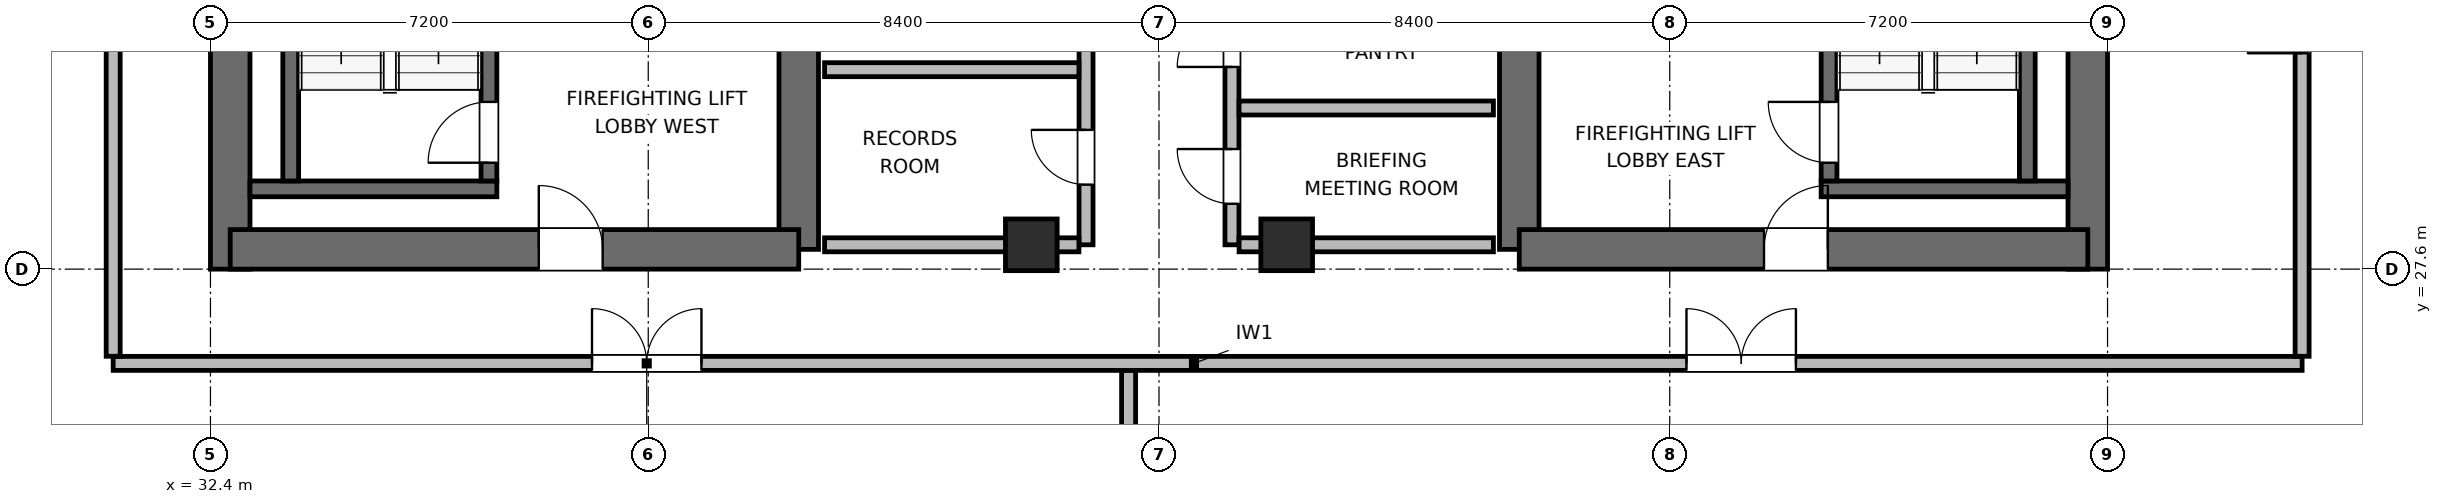
"""IFC4 building model, lengths in metres.
Left out: names, types, materials, properties, quantities, classifications, styles, units other than length and angle.
Written with IfcOpenShell. Run it as: python <this file> out.ifc"""

import sys

from ifc_helpers import new_model, si_unit, direction, frame, frame_2d, origin, origin_2d, place, context, subcontext, project, spatial, rectangle, extrude, element, fill, save


model = new_model("IFC4")
c1 = context("Model", 3, precision=1e-05, world=origin(), true_north=direction((0.0, 1.0)))
c2 = subcontext(c1, "Body", "Model", "MODEL_VIEW")
j1 = project(units=[si_unit("LENGTHUNIT", "METRE"), si_unit("PLANEANGLEUNIT", "RADIAN")], contexts=[c1])
p1 = place(None, origin())
s1 = spatial("IfcSite", under=j1, at=p1, CompositionType="ELEMENT")
p2 = place(p1, origin())
s2 = spatial("IfcBuilding", under=s1, at=p2, CompositionType="ELEMENT")
p3 = place(p2, frame((0.0, 0.0, 255.0)))
s3 = spatial("IfcBuildingStorey", under=s2, at=p3, CompositionType="ELEMENT", Elevation=255.0)
p4 = place(p3, frame((32.725, 27.6, 0.0), z_axis=(0.0, 0.0, 1.0), x_axis=(0.0, 1.0, 0.0)))
e1 = element("IfcWall", 1, at=p4, inside=s3, PredefinedType="SHEAR", context=c2, shape_type="SweptSolid", body=[
    extrude(rectangle(XDim=16.8, YDim=0.65, at=frame_2d((8.4, 0.0))), origin(), (0.0, 0.0, 1.0), 3.9),
])
p5 = place(p3, frame((42.075, 27.925, 0.0), z_axis=(0.0, 0.0, 1.0), x_axis=(0.0, 1.0, 0.0)))
e2 = element("IfcWall", 2, at=p5, inside=s3, PredefinedType="SHEAR", context=c2, shape_type="SweptSolid", body=[
    extrude(rectangle(XDim=6.475, YDim=0.65, at=frame_2d((3.237, 0.0))), origin(), (0.0, 0.0, 1.0), 3.9),
])
p6 = place(p3, frame((32.725, 27.925, 0.0), z_axis=(0.0, 0.0, 1.0), x_axis=(1.0, 0.0, 0.0)))
e3 = element("IfcWall", 3, at=p6, inside=s3, PredefinedType="SHEAR", context=c2, shape_type="SweptSolid", body=[
    extrude(rectangle(XDim=9.35, YDim=0.65, at=frame_2d((4.675, 0.0))), origin(), (0.0, 0.0, 1.0), 3.9),
])
p7 = place(p6, frame((5.075, 0.0, 0.0)))
e4 = element("IfcOpeningElement", 4, at=p7, cuts=e3, PredefinedType="OPENING", context=c2, shape_type="SweptSolid", body=[
    extrude(rectangle(XDim=1.05, YDim=2.04, at=frame_2d((0.525, 1.02))), frame((0.0, 0.335, 0.0), z_axis=(0.0, -1.0, 0.0), x_axis=(1.0, 0.0, 0.0)), (0.0, 0.0, 1.0), 0.67),
])
p8 = place(p3, frame((53.925, 27.925, 0.0), z_axis=(0.0, 0.0, 1.0), x_axis=(0.0, 1.0, 0.0)))
e5 = element("IfcWall", 5, at=p8, inside=s3, PredefinedType="SHEAR", context=c2, shape_type="SweptSolid", body=[
    extrude(rectangle(XDim=7.875, YDim=0.65, at=frame_2d((3.938, 0.0))), origin(), (0.0, 0.0, 1.0), 3.9),
])
p9 = place(p3, frame((63.275, 27.6, 0.0), z_axis=(0.0, 0.0, 1.0), x_axis=(0.0, 1.0, 0.0)))
e6 = element("IfcWall", 6, at=p9, inside=s3, PredefinedType="SHEAR", context=c2, shape_type="SweptSolid", body=[
    extrude(rectangle(XDim=16.8, YDim=0.65, at=frame_2d((8.4, 0.0))), origin(), (0.0, 0.0, 1.0), 3.9),
])
p10 = place(p3, frame((53.925, 27.925, 0.0), z_axis=(0.0, 0.0, 1.0), x_axis=(1.0, 0.0, 0.0)))
e7 = element("IfcWall", 7, at=p10, inside=s3, PredefinedType="SHEAR", context=c2, shape_type="SweptSolid", body=[
    extrude(rectangle(XDim=9.35, YDim=0.65, at=frame_2d((4.675, 0.0))), origin(), (0.0, 0.0, 1.0), 3.9),
])
p11 = place(p10, frame((4.025, 0.0, 0.0)))
e8 = element("IfcOpeningElement", 8, at=p11, cuts=e7, PredefinedType="OPENING", context=c2, shape_type="SweptSolid", body=[
    extrude(rectangle(XDim=1.05, YDim=2.04, at=frame_2d((0.525, 1.02))), frame((0.0, 0.335, 0.0), z_axis=(0.0, -1.0, 0.0), x_axis=(1.0, 0.0, 0.0)), (0.0, 0.0, 1.0), 0.67),
])
p12 = place(p3, frame((33.05, 28.92, 0.0), z_axis=(0.0, 0.0, 1.0), x_axis=(1.0, 0.0, 0.0)))
e9 = element("IfcWall", 9, at=p12, inside=s3, PredefinedType="SHEAR", context=c2, shape_type="SweptSolid", body=[
    extrude(rectangle(XDim=4.06, YDim=0.26, at=frame_2d((2.03, 0.0))), origin(), (0.0, 0.0, 1.0), 3.9),
])
p13 = place(p3, frame((33.72, 29.05, 0.0), z_axis=(0.0, 0.0, 1.0), x_axis=(0.0, 1.0, 0.0)))
e10 = element("IfcWall", 10, at=p13, inside=s3, PredefinedType="SHEAR", context=c2, shape_type="SweptSolid", body=[
    extrude(rectangle(XDim=7.6, YDim=0.26, at=frame_2d((3.8, 0.0))), origin(), (0.0, 0.0, 1.0), 3.9),
])
p14 = place(p3, frame((36.98, 29.05, 0.0), z_axis=(0.0, 0.0, 1.0), x_axis=(0.0, 1.0, 0.0)))
e11 = element("IfcWall", 11, at=p14, inside=s3, PredefinedType="SHEAR", context=c2, shape_type="SweptSolid", body=[
    extrude(rectangle(XDim=7.6, YDim=0.26, at=frame_2d((3.8, 0.0))), origin(), (0.0, 0.0, 1.0), 3.9),
])
p15 = place(p14, frame((0.3, 0.0, 0.0)))
e12 = element("IfcOpeningElement", 12, at=p15, cuts=e11, PredefinedType="OPENING", context=c2, shape_type="SweptSolid", body=[
    extrude(rectangle(XDim=1.0, YDim=2.04, at=frame_2d((0.5, 1.02))), frame((0.0, 0.14, 0.0), z_axis=(0.0, -1.0, 0.0), x_axis=(1.0, 0.0, 0.0)), (0.0, 0.0, 1.0), 0.28),
])
p16 = place(p3, frame((58.89, 28.92, 0.0), z_axis=(0.0, 0.0, 1.0), x_axis=(1.0, 0.0, 0.0)))
e13 = element("IfcWall", 13, at=p16, inside=s3, PredefinedType="SHEAR", context=c2, shape_type="SweptSolid", body=[
    extrude(rectangle(XDim=4.06, YDim=0.26, at=frame_2d((2.03, 0.0))), origin(), (0.0, 0.0, 1.0), 3.9),
])
p17 = place(p3, frame((59.02, 29.05, 0.0), z_axis=(0.0, 0.0, 1.0), x_axis=(0.0, 1.0, 0.0)))
e14 = element("IfcWall", 14, at=p17, inside=s3, PredefinedType="SHEAR", context=c2, shape_type="SweptSolid", body=[
    extrude(rectangle(XDim=7.6, YDim=0.26, at=frame_2d((3.8, 0.0))), origin(), (0.0, 0.0, 1.0), 3.9),
])
p18 = place(p17, frame((0.3, 0.0, 0.0)))
e15 = element("IfcOpeningElement", 15, at=p18, cuts=e14, PredefinedType="OPENING", context=c2, shape_type="SweptSolid", body=[
    extrude(rectangle(XDim=1.0, YDim=2.04, at=frame_2d((0.5, 1.02))), frame((0.0, 0.14, 0.0), z_axis=(0.0, -1.0, 0.0), x_axis=(1.0, 0.0, 0.0)), (0.0, 0.0, 1.0), 0.28),
])
p19 = place(p3, frame((62.28, 29.05, 0.0), z_axis=(0.0, 0.0, 1.0), x_axis=(0.0, 1.0, 0.0)))
e16 = element("IfcWall", 16, at=p19, inside=s3, PredefinedType="SHEAR", context=c2, shape_type="SweptSolid", body=[
    extrude(rectangle(XDim=7.6, YDim=0.26, at=frame_2d((3.8, 0.0))), origin(), (0.0, 0.0, 1.0), 3.9),
])
for number, where, z_axis, x_axis in (
    (17, (45.9, 28.0, 0.0), (0.0, 0.0, 1.0), (1.0, 0.0, 0.0)),
    (18, (50.1, 28.0, 0.0), (0.0, 0.0, 1.0), (1.0, 0.0, 0.0)),
):
    element("IfcColumn", number, at=place(p3, frame(where, z_axis=z_axis, x_axis=x_axis)), inside=s3, PredefinedType="COLUMN", context=c2, shape_type="SweptSolid", body=[
        extrude(rectangle(XDim=0.85, YDim=0.85, at=origin_2d()), origin(), (0.0, 0.0, 1.0), 3.9),
    ])
p20 = place(p3, frame((46.8, 28.0, 0.0), z_axis=(0.0, 0.0, 1.0), x_axis=(0.0, 1.0, 0.0)))
e19 = element("IfcWall", 19, at=p20, inside=s3, PredefinedType="PARTITIONING", context=c2, shape_type="SweptSolid", body=[
    extrude(rectangle(XDim=4.5, YDim=0.23, at=frame_2d((2.25, 0.0))), origin(), (0.0, 0.0, 1.0), 3.68),
])
p21 = place(p20, frame((0.99, 0.0, 0.0)))
e20 = element("IfcOpeningElement", 20, at=p21, cuts=e19, PredefinedType="OPENING", context=c2, shape_type="SweptSolid", body=[
    extrude(rectangle(XDim=0.9, YDim=2.02, at=frame_2d((0.45, 1.01))), frame((0.0, 0.125, 0.0), z_axis=(0.0, -1.0, 0.0), x_axis=(1.0, 0.0, 0.0)), (0.0, 0.0, 1.0), 0.25),
])
p22 = place(p20, frame((3.24, 0.0, 0.0)))
e21 = element("IfcOpeningElement", 21, at=p22, cuts=e19, PredefinedType="OPENING", context=c2, shape_type="SweptSolid", body=[
    extrude(rectangle(XDim=0.9, YDim=2.02, at=frame_2d((0.45, 1.01))), frame((0.0, 0.125, 0.0), z_axis=(0.0, -1.0, 0.0), x_axis=(1.0, 0.0, 0.0)), (0.0, 0.0, 1.0), 0.25),
])
p23 = place(p3, frame((42.5, 28.0, 0.0), z_axis=(0.0, 0.0, 1.0), x_axis=(1.0, 0.0, 0.0)))
e22 = element("IfcWall", 22, at=p23, inside=s3, PredefinedType="PARTITIONING", context=c2, shape_type="SweptSolid", body=[
    extrude(rectangle(XDim=4.183, YDim=0.23, at=frame_2d((2.092, 0.0))), origin(), (0.0, 0.0, 1.0), 2.765),
])
p24 = place(p3, frame((42.5, 30.88, 0.0), z_axis=(0.0, 0.0, 1.0), x_axis=(1.0, 0.0, 0.0)))
e23 = element("IfcWall", 23, at=p24, inside=s3, PredefinedType="PARTITIONING", context=c2, shape_type="SweptSolid", body=[
    extrude(rectangle(XDim=4.183, YDim=0.23, at=frame_2d((2.092, 0.0))), origin(), (0.0, 0.0, 1.0), 3.68),
])
p25 = place(p3, frame((49.2, 28.0, 0.0), z_axis=(0.0, 0.0, 1.0), x_axis=(0.0, 1.0, 0.0)))
e24 = element("IfcWall", 24, at=p25, inside=s3, PredefinedType="PARTITIONING", context=c2, shape_type="SweptSolid", body=[
    extrude(rectangle(XDim=4.5, YDim=0.23, at=frame_2d((2.25, 0.0))), origin(), (0.0, 0.0, 1.0), 3.68),
])
p26 = place(p25, frame((0.675, 0.0, 0.0)))
e25 = element("IfcOpeningElement", 25, at=p26, cuts=e24, PredefinedType="OPENING", context=c2, shape_type="SweptSolid", body=[
    extrude(rectangle(XDim=0.9, YDim=2.02, at=frame_2d((0.45, 1.01))), frame((0.0, 0.125, 0.0), z_axis=(0.0, -1.0, 0.0), x_axis=(1.0, 0.0, 0.0)), (0.0, 0.0, 1.0), 0.25),
])
p27 = place(p25, frame((2.925, 0.0, 0.0)))
e26 = element("IfcOpeningElement", 26, at=p27, cuts=e24, PredefinedType="OPENING", context=c2, shape_type="SweptSolid", body=[
    extrude(rectangle(XDim=0.9, YDim=2.02, at=frame_2d((0.45, 1.01))), frame((0.0, 0.125, 0.0), z_axis=(0.0, -1.0, 0.0), x_axis=(1.0, 0.0, 0.0)), (0.0, 0.0, 1.0), 0.25),
])
p28 = place(p3, frame((49.317, 28.0, 0.0), z_axis=(0.0, 0.0, 1.0), x_axis=(1.0, 0.0, 0.0)))
e27 = element("IfcWall", 27, at=p28, inside=s3, PredefinedType="PARTITIONING", context=c2, shape_type="SweptSolid", body=[
    extrude(rectangle(XDim=4.183, YDim=0.23, at=frame_2d((2.092, 0.0))), origin(), (0.0, 0.0, 1.0), 2.765),
])
p29 = place(p3, frame((49.317, 30.25, 0.0), z_axis=(0.0, 0.0, 1.0), x_axis=(1.0, 0.0, 0.0)))
e28 = element("IfcWall", 28, at=p29, inside=s3, PredefinedType="PARTITIONING", context=c2, shape_type="SweptSolid", body=[
    extrude(rectangle(XDim=4.183, YDim=0.23, at=frame_2d((2.092, 0.0))), origin(), (0.0, 0.0, 1.0), 3.68),
])
p30 = place(p3, frame((30.8, 26.05, 0.0), z_axis=(0.0, 0.0, 1.0), x_axis=(1.0, 0.0, 0.0)))
e29 = element("IfcWall", 29, at=p30, inside=s3, PredefinedType="PARTITIONING", context=c2, shape_type="SweptSolid", body=[
    extrude(rectangle(XDim=36.0, YDim=0.23, at=frame_2d((18.0, 0.0))), origin(), (0.0, 0.0, 1.0), 3.68),
])
p31 = place(p30, frame((7.875, 0.0, 0.0)))
e30 = element("IfcOpeningElement", 30, at=p31, cuts=e29, PredefinedType="OPENING", context=c2, shape_type="SweptSolid", body=[
    extrude(rectangle(XDim=1.8, YDim=2.06, at=frame_2d((0.9, 1.03))), frame((0.0, 0.125, 0.0), z_axis=(0.0, -1.0, 0.0), x_axis=(1.0, 0.0, 0.0)), (0.0, 0.0, 1.0), 0.25),
])
p32 = place(p30, frame((25.875, 0.0, 0.0)))
e31 = element("IfcOpeningElement", 31, at=p32, cuts=e29, PredefinedType="OPENING", context=c2, shape_type="SweptSolid", body=[
    extrude(rectangle(XDim=1.8, YDim=2.06, at=frame_2d((0.9, 1.03))), frame((0.0, 0.125, 0.0), z_axis=(0.0, -1.0, 0.0), x_axis=(1.0, 0.0, 0.0)), (0.0, 0.0, 1.0), 0.25),
])
p33 = place(p3, frame((30.8, 26.167, 0.0), z_axis=(0.0, 0.0, 1.0), x_axis=(0.0, 1.0, 0.0)))
e32 = element("IfcWall", 32, at=p33, inside=s3, PredefinedType="PARTITIONING", context=c2, shape_type="SweptSolid", body=[
    extrude(rectangle(XDim=19.666, YDim=0.23, at=frame_2d((9.833, 0.0))), origin(), (0.0, 0.0, 1.0), 3.68),
])
p34 = place(p33, frame((9.358, 0.0, 0.0)))
e33 = element("IfcOpeningElement", 33, at=p34, cuts=e32, PredefinedType="OPENING", context=c2, shape_type="SweptSolid", body=[
    extrude(rectangle(XDim=1.8, YDim=2.06, at=frame_2d((0.9, 1.03))), frame((0.0, 0.125, 0.0), z_axis=(0.0, -1.0, 0.0), x_axis=(1.0, 0.0, 0.0)), (0.0, 0.0, 1.0), 0.25),
])
p35 = place(p3, frame((66.8, 26.167, 0.0), z_axis=(0.0, 0.0, 1.0), x_axis=(0.0, 1.0, 0.0)))
e34 = element("IfcWall", 34, at=p35, inside=s3, PredefinedType="PARTITIONING", context=c2, shape_type="SweptSolid", body=[
    extrude(rectangle(XDim=19.666, YDim=0.23, at=frame_2d((9.833, 0.0))), origin(), (0.0, 0.0, 1.0), 3.68),
])
p36 = place(p35, frame((4.983, 0.0, 0.0)))
e35 = element("IfcOpeningElement", 35, at=p36, cuts=e34, PredefinedType="OPENING", context=c2, shape_type="SweptSolid", body=[
    extrude(rectangle(XDim=1.8, YDim=2.06, at=frame_2d((0.9, 1.03))), frame((0.0, 0.125, 0.0), z_axis=(0.0, -1.0, 0.0), x_axis=(1.0, 0.0, 0.0)), (0.0, 0.0, 1.0), 0.25),
])
p37 = place(p35, frame((14.933, 0.0, 0.0)))
e36 = element("IfcOpeningElement", 36, at=p37, cuts=e34, PredefinedType="OPENING", context=c2, shape_type="SweptSolid", body=[
    extrude(rectangle(XDim=1.8, YDim=2.06, at=frame_2d((0.9, 1.03))), frame((0.0, 0.125, 0.0), z_axis=(0.0, -1.0, 0.0), x_axis=(1.0, 0.0, 0.0)), (0.0, 0.0, 1.0), 0.25),
])
p38 = place(p3, frame((47.5, 22.04, 0.0), z_axis=(0.0, 0.0, 1.0), x_axis=(0.0, 1.0, 0.0)))
e37 = element("IfcWall", 37, at=p38, inside=s3, PredefinedType="PARTITIONING", context=c2, shape_type="SweptSolid", body=[
    extrude(rectangle(XDim=3.893, YDim=0.23, at=frame_2d((1.947, 0.0))), origin(), (0.0, 0.0, 1.0), 3.68),
])
p39 = place(p15, origin())
e38 = element("IfcDoor", 38, at=p39, inside=s3, OperationType="SINGLE_SWING_LEFT", PredefinedType="DOOR", context=c2, shape_type="SweptSolid", body=[
    extrude(rectangle(XDim=1.0, YDim=2.04, at=frame_2d((0.5, 1.02))), frame((0.0, 0.025, 0.0), z_axis=(0.0, -1.0, 0.0), x_axis=(1.0, 0.0, 0.0)), (0.0, 0.0, 1.0), 0.05),
])
fill(e12, e38)
p40 = place(p18, origin())
e39 = element("IfcDoor", 39, at=p40, inside=s3, OperationType="SINGLE_SWING_RIGHT", PredefinedType="DOOR", context=c2, shape_type="SweptSolid", body=[
    extrude(rectangle(XDim=1.0, YDim=2.04, at=frame_2d((0.5, 1.02))), frame((0.0, 0.025, 0.0), z_axis=(0.0, -1.0, 0.0), x_axis=(1.0, 0.0, 0.0)), (0.0, 0.0, 1.0), 0.05),
])
fill(e15, e39)
p41 = place(p7, origin())
e40 = element("IfcDoor", 40, at=p41, inside=s3, OperationType="SINGLE_SWING_LEFT", PredefinedType="DOOR", context=c2, shape_type="SweptSolid", body=[
    extrude(rectangle(XDim=1.05, YDim=2.04, at=frame_2d((0.525, 1.02))), frame((0.0, 0.025, 0.0), z_axis=(0.0, -1.0, 0.0), x_axis=(1.0, 0.0, 0.0)), (0.0, 0.0, 1.0), 0.05),
])
fill(e4, e40)
p42 = place(p11, origin())
e41 = element("IfcDoor", 41, at=p42, inside=s3, OperationType="SINGLE_SWING_RIGHT", PredefinedType="DOOR", context=c2, shape_type="SweptSolid", body=[
    extrude(rectangle(XDim=1.05, YDim=2.04, at=frame_2d((0.525, 1.02))), frame((0.0, 0.025, 0.0), z_axis=(0.0, -1.0, 0.0), x_axis=(1.0, 0.0, 0.0)), (0.0, 0.0, 1.0), 0.05),
])
fill(e8, e41)
p43 = place(p21, origin())
e42 = element("IfcDoor", 42, at=p43, inside=s3, OperationType="SINGLE_SWING_RIGHT", PredefinedType="DOOR", context=c2, shape_type="SweptSolid", body=[
    extrude(rectangle(XDim=0.9, YDim=2.02, at=frame_2d((0.45, 1.01))), frame((0.0, 0.025, 0.0), z_axis=(0.0, -1.0, 0.0), x_axis=(1.0, 0.0, 0.0)), (0.0, 0.0, 1.0), 0.05),
])
fill(e20, e42)
p44 = place(p26, origin())
e43 = element("IfcDoor", 43, at=p44, inside=s3, OperationType="SINGLE_SWING_RIGHT", PredefinedType="DOOR", context=c2, shape_type="SweptSolid", body=[
    extrude(rectangle(XDim=0.9, YDim=2.02, at=frame_2d((0.45, 1.01))), frame((0.0, 0.025, 0.0), z_axis=(0.0, -1.0, 0.0), x_axis=(1.0, 0.0, 0.0)), (0.0, 0.0, 1.0), 0.05),
])
fill(e25, e43)
p45 = place(p27, origin())
e44 = element("IfcDoor", 44, at=p45, inside=s3, OperationType="SINGLE_SWING_LEFT", PredefinedType="DOOR", context=c2, shape_type="SweptSolid", body=[
    extrude(rectangle(XDim=0.9, YDim=2.02, at=frame_2d((0.45, 1.01))), frame((0.0, 0.025, 0.0), z_axis=(0.0, -1.0, 0.0), x_axis=(1.0, 0.0, 0.0)), (0.0, 0.0, 1.0), 0.05),
])
fill(e26, e44)
p46 = place(p31, origin())
e45 = element("IfcDoor", 45, at=p46, inside=s3, OperationType="DOUBLE_DOOR_SINGLE_SWING", PredefinedType="DOOR", context=c2, shape_type="SweptSolid", body=[
    extrude(rectangle(XDim=1.8, YDim=2.06, at=frame_2d((0.9, 1.03))), frame((0.0, 0.025, 0.0), z_axis=(0.0, -1.0, 0.0), x_axis=(1.0, 0.0, 0.0)), (0.0, 0.0, 1.0), 0.05),
])
fill(e30, e45)
p47 = place(p32, origin())
e46 = element("IfcDoor", 46, at=p47, inside=s3, OperationType="DOUBLE_DOOR_SINGLE_SWING", PredefinedType="DOOR", context=c2, shape_type="SweptSolid", body=[
    extrude(rectangle(XDim=1.8, YDim=2.06, at=frame_2d((0.9, 1.03))), frame((0.0, 0.025, 0.0), z_axis=(0.0, -1.0, 0.0), x_axis=(1.0, 0.0, 0.0)), (0.0, 0.0, 1.0), 0.05),
])
fill(e31, e46)
p48 = place(p36, origin())
e47 = element("IfcDoor", 47, at=p48, inside=s3, OperationType="DOUBLE_DOOR_SINGLE_SWING", PredefinedType="DOOR", context=c2, shape_type="SweptSolid", body=[
    extrude(rectangle(XDim=1.8, YDim=2.06, at=frame_2d((0.9, 1.03))), frame((0.0, 0.025, 0.0), z_axis=(0.0, -1.0, 0.0), x_axis=(1.0, 0.0, 0.0)), (0.0, 0.0, 1.0), 0.05),
])
fill(e35, e47)
save(model, sys.argv[1])
